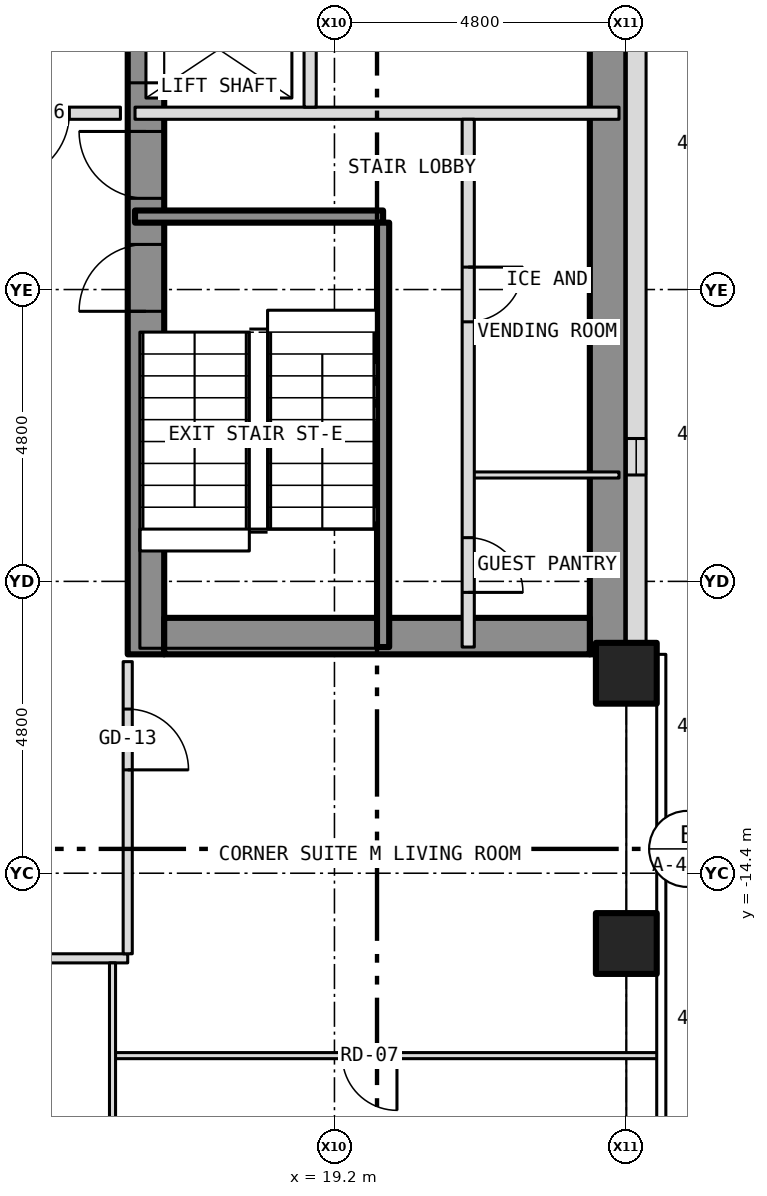
"""IFC4 building model, lengths in metres.
Left out: names, types, materials, properties, quantities, classifications, styles, units other than length and angle.
Written with IfcOpenShell. Run it as: python <this file> out.ifc"""

import sys

from ifc_helpers import new_model, si_unit, direction, frame, frame_2d, origin, origin_2d, place, context, subcontext, project, spatial, rectangle, hollow_rectangle, extrude, element, fill, save


model = new_model("IFC4")
c1 = context("Model", 3, precision=1e-05, world=origin(), true_north=direction((0.0, 1.0)))
c2 = subcontext(c1, "Body", "Model", "MODEL_VIEW")
j1 = project(units=[si_unit("LENGTHUNIT", "METRE"), si_unit("PLANEANGLEUNIT", "RADIAN")], contexts=[c1])
p1 = place(None, origin())
s1 = spatial("IfcSite", under=j1, at=p1, CompositionType="ELEMENT")
p2 = place(p1, origin())
s2 = spatial("IfcBuilding", under=s1, at=p2, CompositionType="ELEMENT")
p3 = place(p2, frame((0.0, 0.0, 46.0)))
s3 = spatial("IfcBuildingStorey", under=s2, at=p3, CompositionType="ELEMENT", Elevation=46.0)
for number, where, z_axis, x_axis in (
    (1, (24.0, -15.556, -0.15), (0.0, 0.0, 1.0), (1.0, 0.0, 0.0)),
    (2, (24.0, -11.111, -0.15), (0.0, 0.0, 1.0), (1.0, 0.0, 0.0)),
):
    element("IfcColumn", number, at=place(p3, frame(where, z_axis=z_axis, x_axis=x_axis)), inside=s3, PredefinedType="COLUMN", context=c2, shape_type="SweptSolid", body=[
        extrude(hollow_rectangle(XDim=1.0, YDim=1.0, WallThickness=0.06, at=origin_2d()), origin(), (0.0, 0.0, 1.0), 3.5),
    ])
p4 = place(p3, frame((16.1, -10.8, 0.0), z_axis=(0.0, 0.0, 1.0), x_axis=(0.0, 1.0, 0.0)))
e3 = element("IfcWall", 3, at=p4, inside=s3, PredefinedType="SHEAR", context=c2, shape_type="SweptSolid", body=[
    extrude(rectangle(XDim=21.6, YDim=0.6, at=frame_2d((10.8, 0.0))), origin(), (0.0, 0.0, 1.0), 3.25),
])
p5 = place(p4, frame((9.4, 0.0, 0.0)))
e4 = element("IfcOpeningElement", 4, at=p5, cuts=e3, PredefinedType="OPENING", context=c2, shape_type="SweptSolid", body=[
    extrude(rectangle(XDim=1.1, YDim=2.1, at=frame_2d((0.55, 1.05))), frame((0.0, 0.312, 0.0), z_axis=(0.0, -1.0, 0.0), x_axis=(1.0, 0.0, 0.0)), (0.0, 0.0, 1.0), 0.624),
])
p6 = place(p4, frame((11.5, 0.0, 0.0)))
e5 = element("IfcOpeningElement", 5, at=p6, cuts=e3, PredefinedType="OPENING", context=c2, shape_type="SweptSolid", body=[
    extrude(rectangle(XDim=1.1, YDim=2.1, at=frame_2d((0.55, 1.05))), frame((0.0, 0.312, 0.0), z_axis=(0.0, -1.0, 0.0), x_axis=(1.0, 0.0, 0.0)), (0.0, 0.0, 1.0), 0.624),
])
p7 = place(p4, frame((13.6, 0.0, 0.0)))
e6 = element("IfcOpeningElement", 6, at=p7, cuts=e3, PredefinedType="OPENING", context=c2, shape_type="SweptSolid", body=[
    extrude(rectangle(XDim=1.1, YDim=2.1, at=frame_2d((0.55, 1.05))), frame((0.0, 0.312, 0.0), z_axis=(0.0, -1.0, 0.0), x_axis=(1.0, 0.0, 0.0)), (0.0, 0.0, 1.0), 0.624),
])
p8 = place(p4, frame((15.7, 0.0, 0.0)))
e7 = element("IfcOpeningElement", 7, at=p8, cuts=e3, PredefinedType="OPENING", context=c2, shape_type="SweptSolid", body=[
    extrude(rectangle(XDim=1.1, YDim=2.1, at=frame_2d((0.55, 1.05))), frame((0.0, 0.312, 0.0), z_axis=(0.0, -1.0, 0.0), x_axis=(1.0, 0.0, 0.0)), (0.0, 0.0, 1.0), 0.624),
])
p9 = place(p4, frame((17.8, 0.0, 0.0)))
e8 = element("IfcOpeningElement", 8, at=p9, cuts=e3, PredefinedType="OPENING", context=c2, shape_type="SweptSolid", body=[
    extrude(rectangle(XDim=1.1, YDim=2.1, at=frame_2d((0.55, 1.05))), frame((0.0, 0.312, 0.0), z_axis=(0.0, -1.0, 0.0), x_axis=(1.0, 0.0, 0.0)), (0.0, 0.0, 1.0), 0.624),
])
p10 = place(p4, frame((5.642, 0.0, 0.0)))
e9 = element("IfcOpeningElement", 9, at=p10, cuts=e3, PredefinedType="OPENING", context=c2, shape_type="SweptSolid", body=[
    extrude(rectangle(XDim=1.1, YDim=2.1, at=frame_2d((0.55, 1.05))), frame((0.0, 0.312, 0.0), z_axis=(0.0, -1.0, 0.0), x_axis=(1.0, 0.0, 0.0)), (0.0, 0.0, 1.0), 0.624),
])
p11 = place(p4, frame((7.5, 0.0, 0.0)))
e10 = element("IfcOpeningElement", 10, at=p11, cuts=e3, PredefinedType="OPENING", context=c2, shape_type="SweptSolid", body=[
    extrude(rectangle(XDim=1.1, YDim=2.1, at=frame_2d((0.55, 1.05))), frame((0.0, 0.312, 0.0), z_axis=(0.0, -1.0, 0.0), x_axis=(1.0, 0.0, 0.0)), (0.0, 0.0, 1.0), 0.624),
])
p12 = place(p3, frame((23.7, -10.8, 0.0), z_axis=(0.0, 0.0, 1.0), x_axis=(0.0, 1.0, 0.0)))
e11 = element("IfcWall", 11, at=p12, inside=s3, PredefinedType="SHEAR", context=c2, shape_type="SweptSolid", body=[
    extrude(rectangle(XDim=21.6, YDim=0.6, at=frame_2d((10.8, 0.0))), origin(), (0.0, 0.0, 1.0), 3.25),
])
p13 = place(p3, frame((16.4, -10.5, 0.0), z_axis=(0.0, 0.0, 1.0), x_axis=(1.0, 0.0, 0.0)))
e12 = element("IfcWall", 12, at=p13, inside=s3, PredefinedType="SHEAR", context=c2, shape_type="SweptSolid", body=[
    extrude(rectangle(XDim=7.0, YDim=0.6, at=frame_2d((3.5, 0.0))), origin(), (0.0, 0.0, 1.0), 3.25),
])
p14 = place(p3, frame((24.163, -10.8, 0.0), z_axis=(0.0, 0.0, 1.0), x_axis=(0.0, 1.0, 0.0)))
e13 = element("IfcWall", 13, at=p14, inside=s3, PredefinedType="SOLIDWALL", context=c2, shape_type="SweptSolid", body=[
    extrude(rectangle(XDim=21.6, YDim=0.325, at=frame_2d((10.8, 0.0))), origin(), (0.0, 0.0, 1.0), 3.5),
])
p15 = place(p14, frame((2.95, 0.0, 1.0)))
e14 = element("IfcOpeningElement", 14, at=p15, cuts=e13, PredefinedType="OPENING", context=c2, shape_type="SweptSolid", body=[
    extrude(rectangle(XDim=0.6, YDim=1.5, at=frame_2d((0.3, 0.75))), frame((0.0, 0.175, 0.0), z_axis=(0.0, -1.0, 0.0), x_axis=(1.0, 0.0, 0.0)), (0.0, 0.0, 1.0), 0.349),
])
p16 = place(p3, frame((15.55, -17.4, 0.0), z_axis=(0.0, 0.0, 1.0), x_axis=(1.0, 0.0, 0.0)))
e15 = element("IfcWall", 15, at=p16, inside=s3, PredefinedType="PARTITIONING", context=c2, shape_type="SweptSolid", body=[
    extrude(rectangle(XDim=8.98, YDim=0.1, at=frame_2d((4.49, 0.0))), origin(), (0.0, 0.0, 1.0), 3.35),
])
p17 = place(p16, frame((3.778, 0.0, 0.0)))
e16 = element("IfcOpeningElement", 16, at=p17, cuts=e15, PredefinedType="OPENING", context=c2, shape_type="SweptSolid", body=[
    extrude(rectangle(XDim=0.9, YDim=2.1, at=frame_2d((0.45, 1.05))), frame((0.0, 0.062, 0.0), z_axis=(0.0, -1.0, 0.0), x_axis=(1.0, 0.0, 0.0)), (0.0, 0.0, 1.0), 0.124),
])
p18 = place(p3, frame((-15.8, -15.8, 0.0), z_axis=(0.0, 0.0, 1.0), x_axis=(1.0, 0.0, 0.0)))
e17 = element("IfcWall", 17, at=p18, inside=s3, PredefinedType="PARTITIONING", context=c2, shape_type="SweptSolid", body=[
    extrude(rectangle(XDim=31.6, YDim=0.15, at=frame_2d((15.8, 0.0))), origin(), (0.0, 0.0, 1.0), 3.35),
])
p19 = place(p18, frame((6.633, 0.0, 0.0)))
e18 = element("IfcOpeningElement", 18, at=p19, cuts=e17, PredefinedType="OPENING", context=c2, shape_type="SweptSolid", body=[
    extrude(rectangle(XDim=1.0, YDim=2.1, at=frame_2d((0.5, 1.05))), frame((0.0, 0.087, 0.0), z_axis=(0.0, -1.0, 0.0), x_axis=(1.0, 0.0, 0.0)), (0.0, 0.0, 1.0), 0.174),
])
p20 = place(p18, frame((11.956, 0.0, 0.0)))
e19 = element("IfcOpeningElement", 19, at=p20, cuts=e17, PredefinedType="OPENING", context=c2, shape_type="SweptSolid", body=[
    extrude(rectangle(XDim=1.0, YDim=2.1, at=frame_2d((0.5, 1.05))), frame((0.0, 0.087, 0.0), z_axis=(0.0, -1.0, 0.0), x_axis=(1.0, 0.0, 0.0)), (0.0, 0.0, 1.0), 0.174),
])
p21 = place(p18, frame((16.4, 0.0, 0.0)))
e20 = element("IfcOpeningElement", 20, at=p21, cuts=e17, PredefinedType="OPENING", context=c2, shape_type="SweptSolid", body=[
    extrude(rectangle(XDim=1.0, YDim=2.1, at=frame_2d((0.5, 1.05))), frame((0.0, 0.087, 0.0), z_axis=(0.0, -1.0, 0.0), x_axis=(1.0, 0.0, 0.0)), (0.0, 0.0, 1.0), 0.174),
])
p22 = place(p18, frame((21.956, 0.0, 0.0)))
e21 = element("IfcOpeningElement", 21, at=p22, cuts=e17, PredefinedType="OPENING", context=c2, shape_type="SweptSolid", body=[
    extrude(rectangle(XDim=1.0, YDim=2.1, at=frame_2d((0.5, 1.05))), frame((0.0, 0.087, 0.0), z_axis=(0.0, -1.0, 0.0), x_axis=(1.0, 0.0, 0.0)), (0.0, 0.0, 1.0), 0.174),
])
p23 = place(p18, frame((28.623, 0.0, 0.0)))
e22 = element("IfcOpeningElement", 22, at=p23, cuts=e17, PredefinedType="OPENING", context=c2, shape_type="SweptSolid", body=[
    extrude(rectangle(XDim=1.0, YDim=2.1, at=frame_2d((0.5, 1.05))), frame((0.0, 0.087, 0.0), z_axis=(0.0, -1.0, 0.0), x_axis=(1.0, 0.0, 0.0)), (0.0, 0.0, 1.0), 0.174),
])
p24 = place(p3, frame((21.4, -7.85, 0.0), z_axis=(0.0, 0.0, 1.0), x_axis=(1.0, 0.0, 0.0)))
e23 = element("IfcWall", 23, at=p24, inside=s3, PredefinedType="PARTITIONING", context=c2, shape_type="SweptSolid", body=[
    extrude(rectangle(XDim=2.48, YDim=0.1, at=frame_2d((1.24, 0.0))), origin(), (0.0, 0.0, 1.0), 3.25),
])
p25 = place(p3, frame((15.92, -3.6, 0.0), z_axis=(0.0, 0.0, 1.0), x_axis=(1.0, 0.0, 0.0)))
e24 = element("IfcWall", 24, at=p25, inside=s3, PredefinedType="SHEAR", context=c2, shape_type="SweptSolid", body=[
    extrude(rectangle(XDim=4.08, YDim=0.2, at=frame_2d((2.04, 0.0))), origin(), (0.0, 0.0, 1.0), 3.25),
])
p26 = place(p3, frame((12.4, -1.9, 0.0), z_axis=(0.0, 0.0, 1.0), x_axis=(1.0, 0.0, 0.0)))
e25 = element("IfcWall", 25, at=p26, inside=s3, PredefinedType="PARTITIONING", context=c2, shape_type="SweptSolid", body=[
    extrude(rectangle(XDim=3.28, YDim=0.2, at=frame_2d((1.64, 0.0))), origin(), (0.0, 0.0, 1.0), 3.35),
])
p27 = place(p26, frame((1.34, 0.0, 0.0)))
e26 = element("IfcOpeningElement", 26, at=p27, cuts=e25, PredefinedType="OPENING", context=c2, shape_type="SweptSolid", body=[
    extrude(rectangle(XDim=1.1, YDim=2.1, at=frame_2d((0.55, 1.05))), frame((0.0, 0.112, 0.0), z_axis=(0.0, -1.0, 0.0), x_axis=(1.0, 0.0, 0.0)), (0.0, 0.0, 1.0), 0.224),
])
p28 = place(p3, frame((15.92, -1.9, 0.0), z_axis=(0.0, 0.0, 1.0), x_axis=(1.0, 0.0, 0.0)))
e27 = element("IfcWall", 27, at=p28, inside=s3, PredefinedType="PARTITIONING", context=c2, shape_type="SweptSolid", body=[
    extrude(rectangle(XDim=7.96, YDim=0.2, at=frame_2d((3.98, 0.0))), origin(), (0.0, 0.0, 1.0), 3.25),
])
p29 = place(p3, frame((15.55, -23.88, 0.0), z_axis=(0.0, 0.0, 1.0), x_axis=(0.0, 1.0, 0.0)))
e28 = element("IfcWall", 28, at=p29, inside=s3, PredefinedType="PARTITIONING", context=c2, shape_type="SweptSolid", body=[
    extrude(rectangle(XDim=8.005, YDim=0.1, at=frame_2d((4.002, 0.0))), origin(), (0.0, 0.0, 1.0), 3.35),
])
p30 = place(p3, frame((15.8, -15.725, 0.0), z_axis=(0.0, 0.0, 1.0), x_axis=(0.0, 1.0, 0.0)))
e29 = element("IfcWall", 29, at=p30, inside=s3, PredefinedType="PARTITIONING", context=c2, shape_type="SweptSolid", body=[
    extrude(rectangle(XDim=4.805, YDim=0.15, at=frame_2d((2.403, 0.0))), origin(), (0.0, 0.0, 1.0), 3.35),
])
p31 = place(p30, frame((3.025, 0.0, 0.0)))
e30 = element("IfcOpeningElement", 30, at=p31, cuts=e29, PredefinedType="OPENING", context=c2, shape_type="SweptSolid", body=[
    extrude(rectangle(XDim=1.0, YDim=2.1, at=frame_2d((0.5, 1.05))), frame((0.0, 0.087, 0.0), z_axis=(0.0, -1.0, 0.0), x_axis=(1.0, 0.0, 0.0)), (0.0, 0.0, 1.0), 0.174),
])
p32 = place(p3, frame((18.8, -1.8, 0.0), z_axis=(0.0, 0.0, 1.0), x_axis=(0.0, 1.0, 0.0)))
e31 = element("IfcWall", 31, at=p32, inside=s3, PredefinedType="PARTITIONING", context=c2, shape_type="SweptSolid", body=[
    extrude(rectangle(XDim=12.48, YDim=0.2, at=frame_2d((6.24, 0.0))), origin(), (0.0, 0.0, 1.0), 3.25),
])
p33 = place(p3, frame((20.0, -10.68, 0.0), z_axis=(0.0, 0.0, 1.0), x_axis=(0.0, 1.0, 0.0)))
e32 = element("IfcWall", 32, at=p33, inside=s3, PredefinedType="SHEAR", context=c2, shape_type="SweptSolid", body=[
    extrude(rectangle(XDim=6.98, YDim=0.2, at=frame_2d((3.49, 0.0))), origin(), (0.0, 0.0, 1.0), 3.25),
])
p34 = place(p3, frame((21.4, -10.68, 0.0), z_axis=(0.0, 0.0, 1.0), x_axis=(0.0, 1.0, 0.0)))
e33 = element("IfcWall", 33, at=p34, inside=s3, PredefinedType="PARTITIONING", context=c2, shape_type="SweptSolid", body=[
    extrude(rectangle(XDim=8.68, YDim=0.2, at=frame_2d((4.34, 0.0))), origin(), (0.0, 0.0, 1.0), 3.25),
])
p35 = place(p34, frame((0.899, 0.0, 0.0)))
e34 = element("IfcOpeningElement", 34, at=p35, cuts=e33, PredefinedType="OPENING", context=c2, shape_type="SweptSolid", body=[
    extrude(rectangle(XDim=0.9, YDim=2.1, at=frame_2d((0.45, 1.05))), frame((0.0, 0.112, 0.0), z_axis=(0.0, -1.0, 0.0), x_axis=(1.0, 0.0, 0.0)), (0.0, 0.0, 1.0), 0.224),
])
p36 = place(p34, frame((5.349, 0.0, 0.0)))
e35 = element("IfcOpeningElement", 35, at=p36, cuts=e33, PredefinedType="OPENING", context=c2, shape_type="SweptSolid", body=[
    extrude(rectangle(XDim=0.9, YDim=2.1, at=frame_2d((0.45, 1.05))), frame((0.0, 0.112, 0.0), z_axis=(0.0, -1.0, 0.0), x_axis=(1.0, 0.0, 0.0)), (0.0, 0.0, 1.0), 0.224),
])
p37 = place(p15, origin())
e36 = element("IfcWindow", 36, at=p37, inside=s3, PartitioningType="SINGLE_PANEL", PredefinedType="WINDOW", context=c2, shape_type="SweptSolid", body=[
    extrude(rectangle(XDim=0.6, YDim=1.5, at=frame_2d((0.3, 0.75))), frame((0.0, -0.073, 0.0), z_axis=(0.0, -1.0, 0.0), x_axis=(1.0, 0.0, 0.0)), (0.0, 0.0, 1.0), 0.06),
])
fill(e14, e36)
p38 = place(p5, origin())
e37 = element("IfcDoor", 37, at=p38, inside=s3, OperationType="SLIDING_TO_LEFT", PredefinedType="DOOR", context=c2, shape_type="SweptSolid", body=[
    extrude(rectangle(XDim=1.1, YDim=2.1, at=frame_2d((0.55, 1.05))), frame((0.0, 0.025, 0.0), z_axis=(0.0, -1.0, 0.0), x_axis=(1.0, 0.0, 0.0)), (0.0, 0.0, 1.0), 0.05),
])
fill(e4, e37)
p39 = place(p10, origin())
e38 = element("IfcDoor", 38, at=p39, inside=s3, OperationType="SINGLE_SWING_LEFT", PredefinedType="DOOR", context=c2, shape_type="SweptSolid", body=[
    extrude(rectangle(XDim=1.1, YDim=2.1, at=frame_2d((0.55, 1.05))), frame((0.0, 0.025, 0.0), z_axis=(0.0, -1.0, 0.0), x_axis=(1.0, 0.0, 0.0)), (0.0, 0.0, 1.0), 0.05),
])
fill(e9, e38)
p40 = place(p11, origin())
e39 = element("IfcDoor", 39, at=p40, inside=s3, OperationType="SINGLE_SWING_RIGHT", PredefinedType="DOOR", context=c2, shape_type="SweptSolid", body=[
    extrude(rectangle(XDim=1.1, YDim=2.1, at=frame_2d((0.55, 1.05))), frame((0.0, 0.025, 0.0), z_axis=(0.0, -1.0, 0.0), x_axis=(1.0, 0.0, 0.0)), (0.0, 0.0, 1.0), 0.05),
])
fill(e10, e39)
p41 = place(p35, origin())
e40 = element("IfcDoor", 40, at=p41, inside=s3, OperationType="SINGLE_SWING_LEFT", PredefinedType="DOOR", context=c2, shape_type="SweptSolid", body=[
    extrude(rectangle(XDim=0.9, YDim=2.1, at=frame_2d((0.45, 1.05))), frame((0.0, 0.025, 0.0), z_axis=(0.0, -1.0, 0.0), x_axis=(1.0, 0.0, 0.0)), (0.0, 0.0, 1.0), 0.05),
])
fill(e34, e40)
p42 = place(p36, origin())
e41 = element("IfcDoor", 41, at=p42, inside=s3, OperationType="SINGLE_SWING_RIGHT", PredefinedType="DOOR", context=c2, shape_type="SweptSolid", body=[
    extrude(rectangle(XDim=0.9, YDim=2.1, at=frame_2d((0.45, 1.05))), frame((0.0, 0.025, 0.0), z_axis=(0.0, -1.0, 0.0), x_axis=(1.0, 0.0, 0.0)), (0.0, 0.0, 1.0), 0.05),
])
fill(e35, e41)
p43 = place(p27, origin())
e42 = element("IfcDoor", 42, at=p43, inside=s3, OperationType="SINGLE_SWING_LEFT", PredefinedType="DOOR", context=c2, shape_type="SweptSolid", body=[
    extrude(rectangle(XDim=1.1, YDim=2.1, at=frame_2d((0.55, 1.05))), frame((0.0, 0.025, 0.0), z_axis=(0.0, -1.0, 0.0), x_axis=(1.0, 0.0, 0.0)), (0.0, 0.0, 1.0), 0.05),
])
fill(e26, e42)
p44 = place(p31, origin())
e43 = element("IfcDoor", 43, at=p44, inside=s3, OperationType="SINGLE_SWING_LEFT", PredefinedType="DOOR", context=c2, shape_type="SweptSolid", body=[
    extrude(rectangle(XDim=1.0, YDim=2.1, at=frame_2d((0.5, 1.05))), frame((0.0, 0.025, 0.0), z_axis=(0.0, -1.0, 0.0), x_axis=(1.0, 0.0, 0.0)), (0.0, 0.0, 1.0), 0.05),
])
fill(e30, e43)
p45 = place(p17, origin())
e44 = element("IfcDoor", 44, at=p45, inside=s3, OperationType="SINGLE_SWING_RIGHT", PredefinedType="DOOR", context=c2, shape_type="SweptSolid", body=[
    extrude(rectangle(XDim=0.9, YDim=2.1, at=frame_2d((0.45, 1.05))), frame((0.0, 0.025, 0.0), z_axis=(0.0, -1.0, 0.0), x_axis=(1.0, 0.0, 0.0)), (0.0, 0.0, 1.0), 0.05),
])
fill(e16, e44)
save(model, sys.argv[1])
